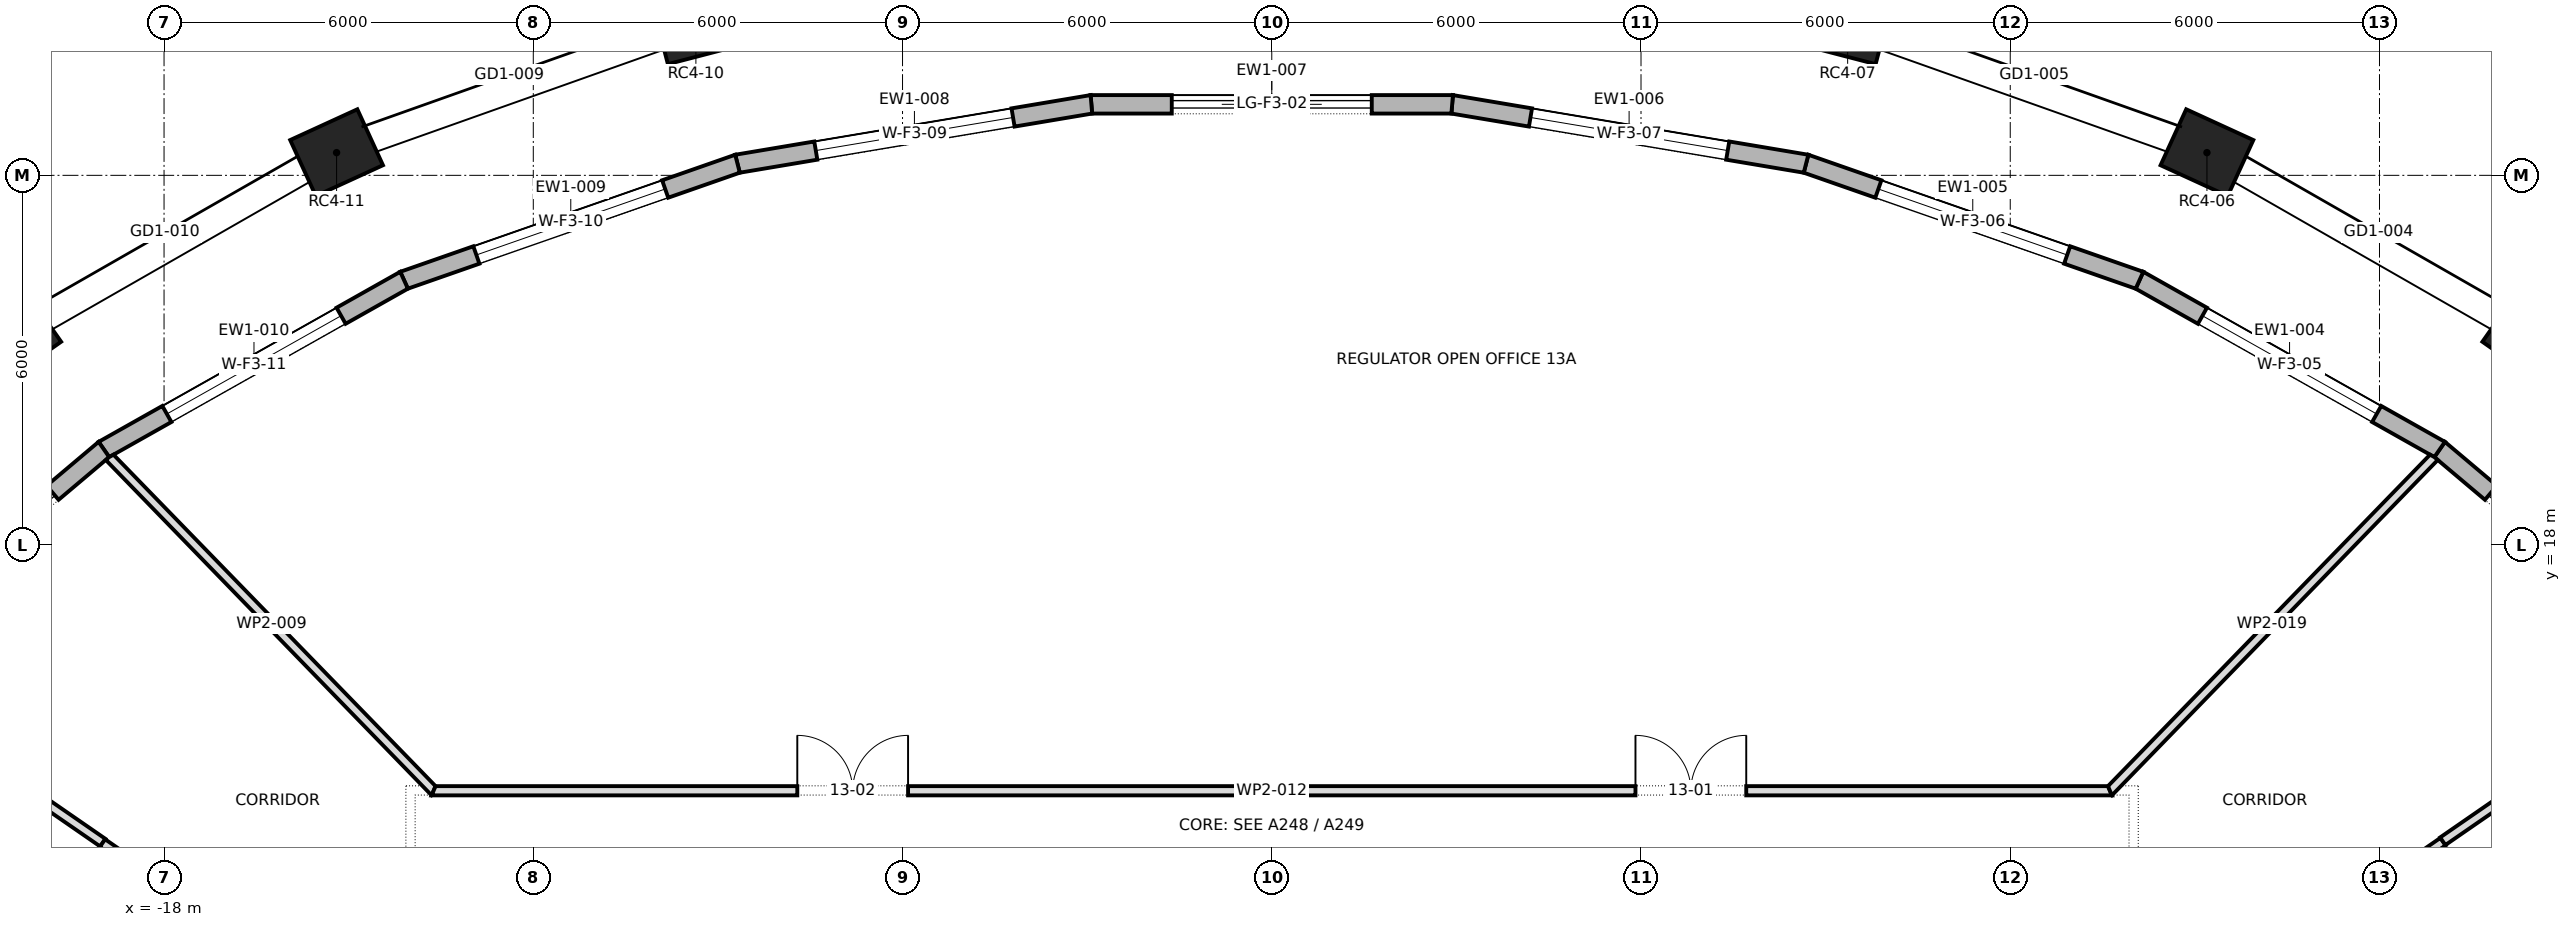
"""IFC4 building model, lengths in metres.
Left out: names, types, materials, properties, quantities, classifications, styles, units other than length and angle.
Written with IfcOpenShell. Run it as: python <this file> out.ifc"""

import sys

from ifc_helpers import new_model, si_unit, direction, frame, frame_2d, origin, origin_2d, place, context, subcontext, project, spatial, polyline, rectangle, outline, extrude, element, fill, save


model = new_model("IFC4")
c1 = context("Model", 3, precision=1e-05, world=origin(), true_north=direction((0.0, 1.0)))
c2 = subcontext(c1, "Body", "Model", "MODEL_VIEW")
j1 = project(units=[si_unit("LENGTHUNIT", "METRE"), si_unit("PLANEANGLEUNIT", "RADIAN")], contexts=[c1])
p1 = place(None, origin())
s1 = spatial("IfcSite", under=j1, at=p1, CompositionType="ELEMENT")
p2 = place(p1, origin())
s2 = spatial("IfcBuilding", under=s1, at=p2, CompositionType="ELEMENT")
p3 = place(p2, frame((0.0, 0.0, 198.9)))
s3 = spatial("IfcBuildingStorey", under=s2, at=p3, CompositionType="ELEMENT", Elevation=198.9)
for number, where, z_axis, x_axis in (
    (1, (20.451, 21.359, 0.0), (0.0, 0.0, 1.0), (-0.818, 0.575, 0.0)),
    (2, (15.196, 24.369, 0.0), (0.0, 0.0, 1.0), (-0.909, 0.417, 0.0)),
    (3, (9.358, 26.442, 0.0), (0.0, 0.0, 1.0), (-0.968, 0.252, 0.0)),
    (4, (-9.358, 26.442, 0.0), (0.0, 0.0, 1.0), (-0.968, -0.252, 0.0)),
    (5, (-15.196, 24.369, 0.0), (0.0, 0.0, 1.0), (-0.909, -0.417, 0.0)),
    (6, (-20.451, 21.359, 0.0), (0.0, 0.0, 1.0), (-0.818, -0.575, 0.0)),
):
    element("IfcColumn", number, at=place(p3, frame(where, z_axis=z_axis, x_axis=x_axis)), inside=s3, PredefinedType="COLUMN", context=c2, shape_type="SweptSolid", body=[
        extrude(rectangle(XDim=1.2, YDim=1.0, at=origin_2d()), origin(), (0.0, 0.0, 1.0), 4.0),
    ])
p4 = place(p3, frame((23.128, 16.044, 0.0), z_axis=(0.0, 0.0, 1.0), x_axis=(-0.764330261608, 0.644824977176, 0.0)))
e7 = element("IfcWall", 7, at=p4, inside=s3, PredefinedType="STANDARD", context=c2, shape_type="SweptSolid", body=[
    extrude(outline(polyline([(-0.015, -0.15), (5.444, -0.15), (5.416, 0.15), (0.015, 0.15), (-0.015, -0.15)])), origin(), (0.0, 0.0, 1.0), 3.7),
])
p5 = place(p4, frame((1.09, 0.0, 0.0)))
e8 = element("IfcOpeningElement", 8, at=p5, cuts=e7, PredefinedType="OPENING", context=c2, shape_type="SweptSolid", body=[
    extrude(rectangle(XDim=3.25, YDim=3.25, at=frame_2d((1.625, 1.625))), frame((0.0, 0.162, 0.0), z_axis=(0.0, -1.0, 0.0), x_axis=(1.0, 0.0, 0.0)), (0.0, 0.0, 1.0), 0.324),
])
p6 = place(p3, frame((18.977, 19.545, 0.0), z_axis=(0.0, 0.0, 1.0), x_axis=(-0.871083701819, 0.491134588912, 0.0)))
e9 = element("IfcWall", 9, at=p6, inside=s3, PredefinedType="STANDARD", context=c2, shape_type="SweptSolid", body=[
    extrude(outline(polyline([(-0.014, -0.15), (5.613, -0.15), (5.586, 0.15), (0.014, 0.15), (-0.014, -0.15)])), origin(), (0.0, 0.0, 1.0), 3.7),
])
p7 = place(p6, frame((1.175, 0.0, 0.6)))
e10 = element("IfcOpeningElement", 10, at=p7, cuts=e9, PredefinedType="OPENING", context=c2, shape_type="SweptSolid", body=[
    extrude(rectangle(XDim=3.25, YDim=2.65, at=frame_2d((1.625, 1.325))), frame((0.0, 0.162, 0.0), z_axis=(0.0, -1.0, 0.0), x_axis=(1.0, 0.0, 0.0)), (0.0, 0.0, 1.0), 0.324),
])
p8 = place(p3, frame((14.1, 22.295, 0.0), z_axis=(0.0, 0.0, 1.0), x_axis=(-0.944020060936, 0.329888048511, 0.0)))
e11 = element("IfcWall", 11, at=p8, inside=s3, PredefinedType="STANDARD", context=c2, shape_type="SweptSolid", body=[
    extrude(outline(polyline([(-0.013, -0.15), (5.752, -0.15), (5.727, 0.15), (0.013, 0.15), (-0.013, -0.15)])), origin(), (0.0, 0.0, 1.0), 3.7),
])
p9 = place(p8, frame((1.245, 0.0, 0.6)))
e12 = element("IfcOpeningElement", 12, at=p9, cuts=e11, PredefinedType="OPENING", context=c2, shape_type="SweptSolid", body=[
    extrude(rectangle(XDim=3.25, YDim=2.65, at=frame_2d((1.625, 1.325))), frame((0.0, 0.162, 0.0), z_axis=(0.0, -1.0, 0.0), x_axis=(1.0, 0.0, 0.0)), (0.0, 0.0, 1.0), 0.324),
])
p10 = place(p3, frame((8.682, 24.189, 0.0), z_axis=(0.0, 0.0, 1.0), x_axis=(-0.986207709048, 0.165512400181, 0.0)))
e13 = element("IfcWall", 13, at=p10, inside=s3, PredefinedType="STANDARD", context=c2, shape_type="SweptSolid", body=[
    extrude(outline(polyline([(-0.013, -0.15), (5.843, -0.15), (5.818, 0.15), (0.013, 0.15), (-0.013, -0.15)])), origin(), (0.0, 0.0, 1.0), 3.7),
])
p11 = place(p10, frame((1.291, 0.0, 0.6)))
e14 = element("IfcOpeningElement", 14, at=p11, cuts=e13, PredefinedType="OPENING", context=c2, shape_type="SweptSolid", body=[
    extrude(rectangle(XDim=3.25, YDim=2.65, at=frame_2d((1.625, 1.325))), frame((0.0, 0.162, 0.0), z_axis=(0.0, -1.0, 0.0), x_axis=(1.0, 0.0, 0.0)), (0.0, 0.0, 1.0), 0.324),
])
p12 = place(p3, frame((2.931, 25.154, 0.0), z_axis=(0.0, 0.0, 1.0), x_axis=(-1.0, 0.0, 0.0)))
e15 = element("IfcWall", 15, at=p12, inside=s3, PredefinedType="STANDARD", context=c2, shape_type="SweptSolid", body=[
    extrude(outline(polyline([(-0.012, -0.15), (5.875, -0.15), (5.85, 0.15), (0.012, 0.15), (-0.012, -0.15)])), origin(), (0.0, 0.0, 1.0), 3.7),
])
p13 = place(p12, frame((1.306, 0.0, 0.0)))
e16 = element("IfcOpeningElement", 16, at=p13, cuts=e15, PredefinedType="OPENING", context=c2, shape_type="SweptSolid", body=[
    extrude(rectangle(XDim=3.25, YDim=3.25, at=frame_2d((1.625, 1.625))), frame((0.0, 0.162, 0.0), z_axis=(0.0, -1.0, 0.0), x_axis=(1.0, 0.0, 0.0)), (0.0, 0.0, 1.0), 0.324),
])
p14 = place(p3, frame((-2.931, 25.154, 0.0), z_axis=(0.0, 0.0, 1.0), x_axis=(-0.986207709048, -0.165512400181, 0.0)))
e17 = element("IfcWall", 17, at=p14, inside=s3, PredefinedType="STANDARD", context=c2, shape_type="SweptSolid", body=[
    extrude(outline(polyline([(-0.012, -0.15), (5.844, -0.15), (5.818, 0.15), (0.012, 0.15), (-0.012, -0.15)])), origin(), (0.0, 0.0, 1.0), 3.7),
])
p15 = place(p14, frame((1.291, 0.0, 0.6)))
e18 = element("IfcOpeningElement", 18, at=p15, cuts=e17, PredefinedType="OPENING", context=c2, shape_type="SweptSolid", body=[
    extrude(rectangle(XDim=3.25, YDim=2.65, at=frame_2d((1.625, 1.325))), frame((0.0, 0.162, 0.0), z_axis=(0.0, -1.0, 0.0), x_axis=(1.0, 0.0, 0.0)), (0.0, 0.0, 1.0), 0.324),
])
p16 = place(p3, frame((-8.682, 24.189, 0.0), z_axis=(0.0, 0.0, 1.0), x_axis=(-0.944020060936, -0.329888048511, 0.0)))
e19 = element("IfcWall", 19, at=p16, inside=s3, PredefinedType="STANDARD", context=c2, shape_type="SweptSolid", body=[
    extrude(outline(polyline([(-0.013, -0.15), (5.753, -0.15), (5.726, 0.15), (0.013, 0.15), (-0.013, -0.15)])), origin(), (0.0, 0.0, 1.0), 3.7),
])
p17 = place(p16, frame((1.245, 0.0, 0.6)))
e20 = element("IfcOpeningElement", 20, at=p17, cuts=e19, PredefinedType="OPENING", context=c2, shape_type="SweptSolid", body=[
    extrude(rectangle(XDim=3.25, YDim=2.65, at=frame_2d((1.625, 1.325))), frame((0.0, 0.162, 0.0), z_axis=(0.0, -1.0, 0.0), x_axis=(1.0, 0.0, 0.0)), (0.0, 0.0, 1.0), 0.324),
])
p18 = place(p3, frame((-14.1, 22.295, 0.0), z_axis=(0.0, 0.0, 1.0), x_axis=(-0.871083701819, -0.491134588912, 0.0)))
e21 = element("IfcWall", 21, at=p18, inside=s3, PredefinedType="STANDARD", context=c2, shape_type="SweptSolid", body=[
    extrude(outline(polyline([(-0.013, -0.15), (5.614, -0.15), (5.585, 0.15), (0.013, 0.15), (-0.013, -0.15)])), origin(), (0.0, 0.0, 1.0), 3.7),
])
p19 = place(p18, frame((1.175, 0.0, 0.6)))
e22 = element("IfcOpeningElement", 22, at=p19, cuts=e21, PredefinedType="OPENING", context=c2, shape_type="SweptSolid", body=[
    extrude(rectangle(XDim=3.25, YDim=2.65, at=frame_2d((1.625, 1.325))), frame((0.0, 0.162, 0.0), z_axis=(0.0, -1.0, 0.0), x_axis=(1.0, 0.0, 0.0)), (0.0, 0.0, 1.0), 0.324),
])
p20 = place(p3, frame((-18.977, 19.545, 0.0), z_axis=(0.0, 0.0, 1.0), x_axis=(-0.764330261608, -0.644824977176, 0.0)))
e23 = element("IfcWall", 23, at=p20, inside=s3, PredefinedType="STANDARD", context=c2, shape_type="SweptSolid", body=[
    extrude(outline(polyline([(-0.014, -0.15), (5.445, -0.15), (5.415, 0.15), (0.014, 0.15), (-0.014, -0.15)])), origin(), (0.0, 0.0, 1.0), 3.7),
])
p21 = place(p20, frame((1.09, 0.0, 0.0)))
e24 = element("IfcOpeningElement", 24, at=p21, cuts=e23, PredefinedType="OPENING", context=c2, shape_type="SweptSolid", body=[
    extrude(rectangle(XDim=3.25, YDim=3.25, at=frame_2d((1.625, 1.625))), frame((0.0, 0.162, 0.0), z_axis=(0.0, -1.0, 0.0), x_axis=(1.0, 0.0, 0.0)), (0.0, 0.0, 1.0), 0.324),
])
p22 = place(p3, frame((-23.024, 15.94, 0.0), z_axis=(0.0, 0.0, 1.0), x_axis=(0.822739240619, -0.568418984505, 0.0)))
e25 = element("IfcWall", 25, at=p22, inside=s3, PredefinedType="PARTITIONING", context=c2, shape_type="SweptSolid", body=[
    extrude(outline(polyline([(4.897, 0.075), (3.273, 0.075), (1.649, 0.075), (0.025, 0.075), (0.005, 0.002), (0.0, -0.069), (0.0, -0.075), (1.632, -0.075), (3.264, -0.075), (4.897, -0.075), (4.897, 0.075)])), origin(), (0.0, 0.0, 1.0), 3.7),
])
p23 = place(p3, frame((-19.0, 4.926, 0.0), z_axis=(0.0, 0.0, 1.0), x_axis=(0.0, 1.0, 0.0)))
e26 = element("IfcWall", 26, at=p23, inside=s3, PredefinedType="PARTITIONING", context=c2, shape_type="SweptSolid", body=[
    extrude(outline(polyline([(0.0, -0.05), (1.62, -0.05), (3.239, -0.05), (4.859, -0.05), (6.479, -0.05), (8.098, -0.05), (8.162, 0.043), (8.169, 0.038), (8.177, 0.05), (8.177, 0.05), (6.547, 0.05), (4.917, 0.05), (3.286, 0.05), (1.656, 0.05), (0.025, 0.05), (0.0, -0.049), (0.0, -0.05)])), origin(), (0.0, 0.0, 1.0), 3.7),
])
p24 = place(p23, frame((3.629, 0.0, 0.0)))
e27 = element("IfcOpeningElement", 27, at=p24, cuts=e26, PredefinedType="OPENING", context=c2, shape_type="SweptSolid", body=[
    extrude(rectangle(XDim=0.9, YDim=2.1, at=frame_2d((0.45, 1.05))), frame((0.0, 0.062, 0.0), z_axis=(0.0, -1.0, 0.0), x_axis=(1.0, 0.0, 0.0)), (0.0, 0.0, 1.0), 0.124),
])
p25 = place(p3, frame((-19.0, 13.15, 0.0), z_axis=(0.0, 0.0, 1.0), x_axis=(0.822301327334, -0.569052306088, 0.0)))
e28 = element("IfcWall", 28, at=p25, inside=s3, PredefinedType="PARTITIONING", context=c2, shape_type="SweptSolid", body=[
    extrude(outline(polyline([(0.0, -0.075), (1.51, -0.075), (3.021, -0.075), (4.531, -0.075), (6.041, -0.075), (6.12, 0.075), (4.59, 0.075), (3.06, 0.075), (1.53, 0.075), (0.0, 0.075), (0.0, -0.075)])), origin(), (0.0, 0.0, 1.0), 2.947),
])
p26 = place(p3, frame((-18.893, 19.427, 0.0), z_axis=(0.0, 0.0, 1.0), x_axis=(0.696864554069, -0.717202756048, 0.0)))
e29 = element("IfcWall", 29, at=p26, inside=s3, PredefinedType="PARTITIONING", context=c2, shape_type="SweptSolid", body=[
    extrude(outline(polyline([(0.0, -0.075), (1.9, -0.075), (3.799, -0.075), (5.699, -0.075), (7.599, -0.075), (7.567, 0.0), (7.535, 0.075), (5.658, 0.075), (3.78, 0.075), (1.903, 0.075), (0.025, 0.075), (0.005, -0.003), (0.0, -0.073), (0.0, -0.075)])), origin(), (0.0, 0.0, 1.0), 3.7),
])
p27 = place(p3, frame((-13.652, 14.0, 0.0), z_axis=(0.0, 0.0, 1.0), x_axis=(1.0, 0.0, 0.0)))
e30 = element("IfcWall", 30, at=p27, inside=s3, PredefinedType="PARTITIONING", context=c2, shape_type="SweptSolid", body=[
    extrude(outline(polyline([(27.303, -0.075), (27.303, -0.075), (27.24, 0.075), (25.299, 0.075), (23.358, 0.075), (21.416, 0.075), (19.475, 0.075), (17.534, 0.075), (15.593, 0.075), (13.652, 0.075), (11.71, 0.075), (9.769, 0.075), (7.828, 0.075), (5.887, 0.075), (3.946, 0.075), (2.004, 0.075), (0.063, 0.075), (0.0, -0.075), (0.0, -0.075), (1.95, -0.075), (3.9, -0.075), (5.851, -0.075), (7.801, -0.075), (9.751, -0.075), (11.701, -0.075), (13.652, -0.075), (15.602, -0.075), (17.552, -0.075), (19.502, -0.075), (21.453, -0.075), (23.403, -0.075), (25.353, -0.075), (27.303, -0.075)])), origin(), (0.0, 0.0, 1.0), 3.7),
])
p28 = place(p27, frame((19.562, 0.0, 0.0)))
e31 = element("IfcOpeningElement", 31, at=p28, cuts=e30, PredefinedType="OPENING", context=c2, shape_type="SweptSolid", body=[
    extrude(rectangle(XDim=1.8, YDim=2.1, at=frame_2d((0.9, 1.05))), frame((0.0, 0.087, 0.0), z_axis=(0.0, -1.0, 0.0), x_axis=(1.0, 0.0, 0.0)), (0.0, 0.0, 1.0), 0.174),
])
p29 = place(p27, frame((5.942, 0.0, 0.0)))
e32 = element("IfcOpeningElement", 32, at=p29, cuts=e30, PredefinedType="OPENING", context=c2, shape_type="SweptSolid", body=[
    extrude(rectangle(XDim=1.8, YDim=2.1, at=frame_2d((0.9, 1.05))), frame((0.0, 0.087, 0.0), z_axis=(0.0, -1.0, 0.0), x_axis=(1.0, 0.0, 0.0)), (0.0, 0.0, 1.0), 0.174),
])
p30 = place(p3, frame((13.598, 13.977, 0.0), z_axis=(0.0, 0.0, 1.0), x_axis=(0.696864554069, 0.717202756048, 0.0)))
e33 = element("IfcWall", 33, at=p30, inside=s3, PredefinedType="PARTITIONING", context=c2, shape_type="SweptSolid", body=[
    extrude(outline(polyline([(7.599, -0.075), (7.599, -0.074), (7.594, -0.003), (7.573, 0.075), (5.696, 0.075), (3.818, 0.075), (1.941, 0.075), (0.063, 0.075), (0.032, 0.0), (0.0, -0.075), (1.9, -0.075), (3.799, -0.075), (5.699, -0.075), (7.599, -0.075)])), origin(), (0.0, 0.0, 1.0), 3.7),
])
p31 = place(p3, frame((13.968, 9.667, 0.0), z_axis=(0.0, 0.0, 1.0), x_axis=(0.822290630684, 0.569067762827, 0.0)))
e34 = element("IfcWall", 34, at=p31, inside=s3, PredefinedType="PARTITIONING", context=c2, shape_type="SweptSolid", body=[
    extrude(outline(polyline([(6.16, 0.075), (4.62, 0.075), (3.08, 0.075), (1.54, 0.075), (0.0, 0.075), (0.079, -0.075), (1.599, -0.075), (3.119, -0.075), (4.64, -0.075), (6.16, -0.075), (6.16, 0.075)])), origin(), (0.0, 0.0, 1.0), 2.947),
])
p32 = place(p3, frame((19.028, 13.179, 0.0), z_axis=(0.0, 0.0, 1.0), x_axis=(0.822732902653, 0.568428158074, 0.0)))
e35 = element("IfcWall", 35, at=p32, inside=s3, PredefinedType="PARTITIONING", context=c2, shape_type="SweptSolid", body=[
    extrude(outline(polyline([(4.857, -0.075), (4.857, -0.068), (4.852, 0.002), (4.832, 0.075), (3.221, 0.075), (1.611, 0.075), (0.0, 0.075), (0.0, -0.04), (0.0, -0.075), (1.619, -0.075), (3.238, -0.075), (4.857, -0.075)])), origin(), (0.0, 0.0, 1.0), 3.7),
])
p33 = place(p3, frame((19.0, 13.093, 0.0), z_axis=(0.0, 0.0, 1.0), x_axis=(0.0, -1.0, 0.0)))
e36 = element("IfcWall", 36, at=p33, inside=s3, PredefinedType="PARTITIONING", context=c2, shape_type="SweptSolid", body=[
    extrude(outline(polyline([(8.167, -0.05), (8.167, -0.049), (8.142, 0.05), (6.513, 0.05), (4.885, 0.05), (3.257, 0.05), (1.628, 0.05), (0.0, 0.05), (0.0, 0.05), (0.069, -0.05), (1.688, -0.05), (3.308, -0.05), (4.928, -0.05), (6.547, -0.05), (8.167, -0.05)])), origin(), (0.0, 0.0, 1.0), 3.7),
])
p34 = place(p33, frame((3.638, 0.0, 0.0)))
e37 = element("IfcOpeningElement", 37, at=p34, cuts=e36, PredefinedType="OPENING", context=c2, shape_type="SweptSolid", body=[
    extrude(rectangle(XDim=0.9, YDim=2.1, at=frame_2d((0.45, 1.05))), frame((0.0, 0.062, 0.0), z_axis=(0.0, -1.0, 0.0), x_axis=(1.0, 0.0, 0.0)), (0.0, 0.0, 1.0), 0.124),
])
p35 = place(p5, origin())
e38 = element("IfcDoor", 38, at=p35, inside=s3, OperationType="DOUBLE_DOOR_SLIDING", PredefinedType="DOOR", context=c2, shape_type="SweptSolid", body=[
    extrude(rectangle(XDim=3.25, YDim=3.25, at=frame_2d((1.625, 1.625))), frame((0.0, 0.025, 0.0), z_axis=(0.0, -1.0, 0.0), x_axis=(1.0, 0.0, 0.0)), (0.0, 0.0, 1.0), 0.05),
])
fill(e8, e38)
p36 = place(p7, origin())
e39 = element("IfcWindow", 39, at=p36, inside=s3, PartitioningType="TRIPLE_PANEL_VERTICAL", PredefinedType="WINDOW", context=c2, shape_type="SweptSolid", body=[
    extrude(rectangle(XDim=3.25, YDim=2.65, at=frame_2d((1.625, 1.325))), frame((0.0, 0.03, 0.0), z_axis=(0.0, -1.0, 0.0), x_axis=(1.0, 0.0, 0.0)), (0.0, 0.0, 1.0), 0.06),
])
fill(e10, e39)
p37 = place(p9, origin())
e40 = element("IfcWindow", 40, at=p37, inside=s3, PartitioningType="TRIPLE_PANEL_VERTICAL", PredefinedType="WINDOW", context=c2, shape_type="SweptSolid", body=[
    extrude(rectangle(XDim=3.25, YDim=2.65, at=frame_2d((1.625, 1.325))), frame((0.0, 0.03, 0.0), z_axis=(0.0, -1.0, 0.0), x_axis=(1.0, 0.0, 0.0)), (0.0, 0.0, 1.0), 0.06),
])
fill(e12, e40)
p38 = place(p11, origin())
e41 = element("IfcWindow", 41, at=p38, inside=s3, PartitioningType="TRIPLE_PANEL_VERTICAL", PredefinedType="WINDOW", context=c2, shape_type="SweptSolid", body=[
    extrude(rectangle(XDim=3.25, YDim=2.65, at=frame_2d((1.625, 1.325))), frame((0.0, 0.03, 0.0), z_axis=(0.0, -1.0, 0.0), x_axis=(1.0, 0.0, 0.0)), (0.0, 0.0, 1.0), 0.06),
])
fill(e14, e41)
p39 = place(p13, origin())
e42 = element("IfcDoor", 42, at=p39, inside=s3, OperationType="DOUBLE_DOOR_SLIDING", PredefinedType="DOOR", context=c2, shape_type="SweptSolid", body=[
    extrude(rectangle(XDim=3.25, YDim=3.25, at=frame_2d((1.625, 1.625))), frame((0.0, 0.025, 0.0), z_axis=(0.0, -1.0, 0.0), x_axis=(1.0, 0.0, 0.0)), (0.0, 0.0, 1.0), 0.05),
])
fill(e16, e42)
p40 = place(p15, origin())
e43 = element("IfcWindow", 43, at=p40, inside=s3, PartitioningType="TRIPLE_PANEL_VERTICAL", PredefinedType="WINDOW", context=c2, shape_type="SweptSolid", body=[
    extrude(rectangle(XDim=3.25, YDim=2.65, at=frame_2d((1.625, 1.325))), frame((0.0, 0.03, 0.0), z_axis=(0.0, -1.0, 0.0), x_axis=(1.0, 0.0, 0.0)), (0.0, 0.0, 1.0), 0.06),
])
fill(e18, e43)
p41 = place(p17, origin())
e44 = element("IfcWindow", 44, at=p41, inside=s3, PartitioningType="TRIPLE_PANEL_VERTICAL", PredefinedType="WINDOW", context=c2, shape_type="SweptSolid", body=[
    extrude(rectangle(XDim=3.25, YDim=2.65, at=frame_2d((1.625, 1.325))), frame((0.0, 0.03, 0.0), z_axis=(0.0, -1.0, 0.0), x_axis=(1.0, 0.0, 0.0)), (0.0, 0.0, 1.0), 0.06),
])
fill(e20, e44)
p42 = place(p19, origin())
e45 = element("IfcWindow", 45, at=p42, inside=s3, PartitioningType="TRIPLE_PANEL_VERTICAL", PredefinedType="WINDOW", context=c2, shape_type="SweptSolid", body=[
    extrude(rectangle(XDim=3.25, YDim=2.65, at=frame_2d((1.625, 1.325))), frame((0.0, 0.03, 0.0), z_axis=(0.0, -1.0, 0.0), x_axis=(1.0, 0.0, 0.0)), (0.0, 0.0, 1.0), 0.06),
])
fill(e22, e45)
p43 = place(p21, origin())
e46 = element("IfcDoor", 46, at=p43, inside=s3, OperationType="DOUBLE_DOOR_SLIDING", PredefinedType="DOOR", context=c2, shape_type="SweptSolid", body=[
    extrude(rectangle(XDim=3.25, YDim=3.25, at=frame_2d((1.625, 1.625))), frame((0.0, 0.025, 0.0), z_axis=(0.0, -1.0, 0.0), x_axis=(1.0, 0.0, 0.0)), (0.0, 0.0, 1.0), 0.05),
])
fill(e24, e46)
p44 = place(p28, origin())
e47 = element("IfcDoor", 47, at=p44, inside=s3, OperationType="DOUBLE_DOOR_SINGLE_SWING", PredefinedType="DOOR", context=c2, shape_type="SweptSolid", body=[
    extrude(rectangle(XDim=1.8, YDim=2.1, at=frame_2d((0.9, 1.05))), frame((0.0, 0.025, 0.0), z_axis=(0.0, -1.0, 0.0), x_axis=(1.0, 0.0, 0.0)), (0.0, 0.0, 1.0), 0.05),
])
fill(e31, e47)
p45 = place(p29, origin())
e48 = element("IfcDoor", 48, at=p45, inside=s3, OperationType="DOUBLE_DOOR_SINGLE_SWING", PredefinedType="DOOR", context=c2, shape_type="SweptSolid", body=[
    extrude(rectangle(XDim=1.8, YDim=2.1, at=frame_2d((0.9, 1.05))), frame((0.0, 0.025, 0.0), z_axis=(0.0, -1.0, 0.0), x_axis=(1.0, 0.0, 0.0)), (0.0, 0.0, 1.0), 0.05),
])
fill(e32, e48)
save(model, sys.argv[1])
